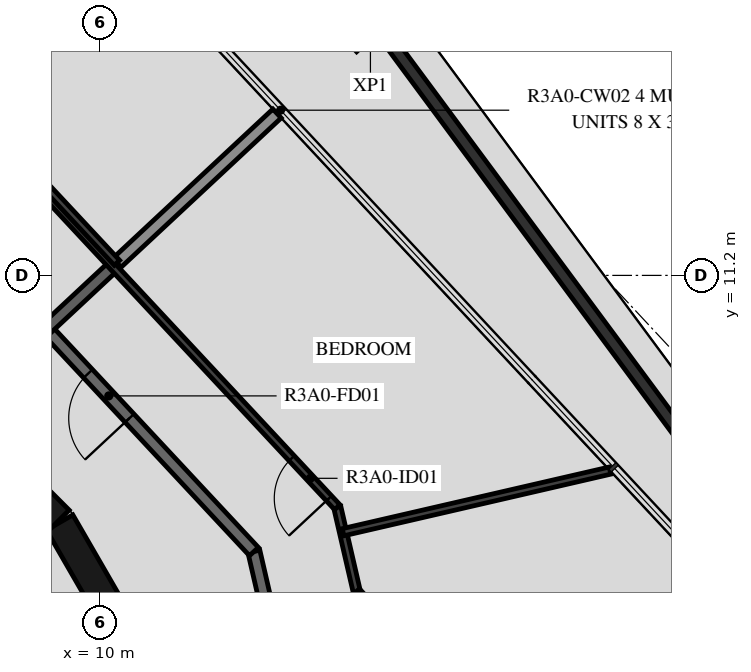
"""IFC4 building model, lengths in metres.
Left out: names, types, materials, properties, quantities, classifications, styles, units other than length and angle.
Written with IfcOpenShell. Run it as: python <this file> out.ifc"""

import sys

from ifc_helpers import new_model, si_unit, direction, frame, frame_2d, origin, place, context, subcontext, project, spatial, rectangle, extrude, element, fill, save


model = new_model("IFC4")
c1 = context("Model", 3, precision=1e-05, world=origin(), true_north=direction((0.0, 1.0)))
c2 = subcontext(c1, "Body", "Model", "MODEL_VIEW")
j1 = project(units=[si_unit("LENGTHUNIT", "METRE"), si_unit("PLANEANGLEUNIT", "RADIAN")], contexts=[c1])
p1 = place(None, origin())
s1 = spatial("IfcSite", under=j1, at=p1, CompositionType="ELEMENT")
p2 = place(p1, origin())
s2 = spatial("IfcBuilding", under=s1, at=p2, CompositionType="ELEMENT")
p3 = place(p2, frame((0.0, 0.0, 113.4)))
s3 = spatial("IfcBuildingStorey", under=s2, at=p3, CompositionType="ELEMENT", Elevation=113.4)
p4 = place(p3, frame((5.146, 28.027, 0.03), z_axis=(0.0, 0.0, 1.0), x_axis=(0.595048436217, -0.803689839774, 0.0)))
e1 = element("IfcWall", 1, at=p4, inside=s3, PredefinedType="PARAPET", context=c2, shape_type="SweptSolid", body=[
    extrude(rectangle(XDim=35.306, YDim=0.2, at=frame_2d((17.653, 0.0))), origin(), (0.0, 0.0, 1.0), 1.5),
])
p5 = place(p3, frame((10.845, 4.51, 0.0), z_axis=(0.0, 0.0, 1.0), x_axis=(-0.500087131594, 0.865975092491, 0.0)))
e2 = element("IfcWall", 2, at=p5, inside=s3, PredefinedType="SHEAR", context=c2, shape_type="SweptSolid", body=[
    extrude(rectangle(XDim=3.033, YDim=0.5, at=frame_2d((1.516, 0.0))), origin(), (0.0, 0.0, 1.0), 3.12),
])
p6 = place(p3, frame((9.308, 7.164, 0.0), z_axis=(0.0, 0.0, 1.0), x_axis=(-0.707106781187, 0.707106781187, 0.0)))
e3 = element("IfcWall", 3, at=p6, inside=s3, PredefinedType="SHEAR", context=c2, shape_type="SweptSolid", body=[
    extrude(rectangle(XDim=3.032, YDim=0.5, at=frame_2d((1.516, 0.0))), origin(), (0.0, 0.0, 1.0), 3.12),
])
p7 = place(p6, frame((0.416, 0.0, 0.0)))
e4 = element("IfcOpeningElement", 4, at=p7, cuts=e3, PredefinedType="OPENING", context=c2, shape_type="SweptSolid", body=[
    extrude(rectangle(XDim=1.2, YDim=2.1, at=frame_2d((0.6, 1.05))), frame((0.0, 0.26, 0.0), z_axis=(0.0, -1.0, 0.0), x_axis=(1.0, 0.0, 0.0)), (0.0, 0.0, 1.0), 0.52),
])
p8 = place(p3, frame((14.175, -0.495, 0.0), z_axis=(0.0, 0.0, 1.0), x_axis=(-0.224922649383, 0.974376622151, 0.0)))
e5 = element("IfcWall", 5, at=p8, inside=s3, PredefinedType="STANDARD", context=c2, shape_type="SweptSolid", body=[
    extrude(rectangle(XDim=7.342, YDim=0.2, at=frame_2d((3.671, 0.0))), origin(), (0.0, 0.0, 1.0), 3.12),
])
p9 = place(p3, frame((12.523, 6.659, 0.0), z_axis=(0.0, 0.0, 1.0), x_axis=(-0.682001841105, 0.731350455479, 0.0)))
e6 = element("IfcWall", 6, at=p9, inside=s3, PredefinedType="STANDARD", context=c2, shape_type="SweptSolid", body=[
    extrude(rectangle(XDim=7.342, YDim=0.2, at=frame_2d((3.671, 0.0))), origin(), (0.0, 0.0, 1.0), 3.12),
])
p10 = place(p9, frame((3.0, 0.0, 0.0)))
e7 = element("IfcOpeningElement", 7, at=p10, cuts=e6, PredefinedType="OPENING", context=c2, shape_type="SweptSolid", body=[
    extrude(rectangle(XDim=1.0, YDim=2.1, at=frame_2d((0.5, 1.05))), frame((0.0, 0.11, 0.0), z_axis=(0.0, -1.0, 0.0), x_axis=(1.0, 0.0, 0.0)), (0.0, 0.0, 1.0), 0.22),
])
p11 = place(p9, frame((5.209, 0.0, 0.0)))
e8 = element("IfcOpeningElement", 8, at=p11, cuts=e6, PredefinedType="OPENING", context=c2, shape_type="SweptSolid", body=[
    extrude(rectangle(XDim=1.0, YDim=2.1, at=frame_2d((0.5, 1.05))), frame((0.0, 0.11, 0.0), z_axis=(0.0, -1.0, 0.0), x_axis=(1.0, 0.0, 0.0)), (0.0, 0.0, 1.0), 0.22),
])
p12 = place(p3, frame((10.233, 11.372, 0.0), z_axis=(0.0, 0.0, 1.0), x_axis=(-0.731329353292, -0.682024469513, 0.0)))
e9 = element("IfcWall", 9, at=p12, inside=s3, PredefinedType="STANDARD", context=c2, shape_type="SweptSolid", body=[
    extrude(rectangle(XDim=1.54, YDim=0.2, at=frame_2d((0.77, 0.0))), origin(), (0.0, 0.0, 1.0), 3.12),
])
p13 = place(p3, frame((12.903, 13.862, 0.0), z_axis=(0.0, 0.0, 1.0), x_axis=(-0.731328084739, -0.682025829769, 0.0)))
e10 = element("IfcWall", 10, at=p13, inside=s3, PredefinedType="STANDARD", context=c2, shape_type="SweptSolid", body=[
    extrude(rectangle(XDim=3.6, YDim=0.2, at=frame_2d((1.8, 0.0))), origin(), (0.0, 0.0, 1.0), 2.73),
])
p14 = place(p3, frame((15.727, -0.549, 0.0), z_axis=(0.0, 0.0, 1.0), x_axis=(-0.22493611855, 0.974373512864, 0.0)))
e11 = element("IfcWall", 11, at=p14, inside=s3, PredefinedType="PARTITIONING", context=c2, shape_type="SweptSolid", body=[
    extrude(rectangle(XDim=8.146, YDim=0.12, at=frame_2d((4.073, 0.0))), origin(), (0.0, 0.0, 1.0), 3.12),
])
p15 = place(p14, frame((1.314, 0.0, 0.0)))
e12 = element("IfcOpeningElement", 12, at=p15, cuts=e11, PredefinedType="OPENING", context=c2, shape_type="SweptSolid", body=[
    extrude(rectangle(XDim=0.8, YDim=2.1, at=frame_2d((0.4, 1.05))), frame((0.0, 0.07, 0.0), z_axis=(0.0, -1.0, 0.0), x_axis=(1.0, 0.0, 0.0)), (0.0, 0.0, 1.0), 0.14),
])
p16 = place(p3, frame((13.894, 7.388, 0.0), z_axis=(0.0, 0.0, 1.0), x_axis=(-0.681994622729, 0.731357186721, 0.0)))
e13 = element("IfcWall", 13, at=p16, inside=s3, PredefinedType="PARTITIONING", context=c2, shape_type="SweptSolid", body=[
    extrude(rectangle(XDim=8.146, YDim=0.12, at=frame_2d((4.073, 0.0))), origin(), (0.0, 0.0, 1.0), 3.12),
])
p17 = place(p16, frame((0.2, 0.0, 0.0)))
e14 = element("IfcOpeningElement", 14, at=p17, cuts=e13, PredefinedType="OPENING", context=c2, shape_type="SweptSolid", body=[
    extrude(rectangle(XDim=0.9, YDim=2.1, at=frame_2d((0.45, 1.05))), frame((0.0, 0.07, 0.0), z_axis=(0.0, -1.0, 0.0), x_axis=(1.0, 0.0, 0.0)), (0.0, 0.0, 1.0), 0.14),
])
p18 = place(p3, frame((14.213, 6.006, 0.0), z_axis=(0.0, 0.0, 1.0), x_axis=(0.681982148724, -0.731368818601, 0.0)))
e15 = element("IfcWall", 15, at=p18, inside=s3, PredefinedType="PARTITIONING", context=c2, shape_type="SweptSolid", body=[
    extrude(rectangle(XDim=10.07, YDim=0.12, at=frame_2d((5.035, 0.0))), origin(), (0.0, 0.0, 1.0), 3.12),
])
p19 = place(p18, frame((5.235, 0.0, 0.0)))
e16 = element("IfcOpeningElement", 16, at=p19, cuts=e15, PredefinedType="OPENING", context=c2, shape_type="SweptSolid", body=[
    extrude(rectangle(XDim=0.9, YDim=2.1, at=frame_2d((0.45, 1.05))), frame((0.0, 0.07, 0.0), z_axis=(0.0, -1.0, 0.0), x_axis=(1.0, 0.0, 0.0)), (0.0, 0.0, 1.0), 0.14),
])
p20 = place(p3, frame((18.379, 7.99, 0.0), z_axis=(0.0, 0.0, 1.0), x_axis=(-0.974372926515, -0.224938658471, 0.0)))
e17 = element("IfcWall", 17, at=p20, inside=s3, PredefinedType="PARTITIONING", context=c2, shape_type="SweptSolid", body=[
    extrude(rectangle(XDim=4.505, YDim=0.12, at=frame_2d((2.253, 0.0))), origin(), (0.0, 0.0, 1.0), 3.12),
])
p21 = place(p3, frame((-1.539, 24.071, 0.0), z_axis=(0.0, 0.0, 1.0), x_axis=(0.68200220595, -0.731350115252, 0.0)))
e18 = element("IfcWall", 18, at=p21, inside=s3, PredefinedType="PARTITIONING", context=c2, shape_type="SweptSolid", body=[
    extrude(rectangle(XDim=17.316, YDim=0.12, at=frame_2d((8.658, 0.0))), origin(), (0.0, 0.0, 1.0), 3.12),
])
p22 = place(p21, frame((3.323, 0.0, 0.0)))
e19 = element("IfcOpeningElement", 19, at=p22, cuts=e18, PredefinedType="OPENING", context=c2, shape_type="SweptSolid", body=[
    extrude(rectangle(XDim=0.9, YDim=2.1, at=frame_2d((0.45, 1.05))), frame((0.0, 0.07, 0.0), z_axis=(0.0, -1.0, 0.0), x_axis=(1.0, 0.0, 0.0)), (0.0, 0.0, 1.0), 0.14),
])
p23 = place(p21, frame((1.417, 0.0, 0.0)))
e20 = element("IfcOpeningElement", 20, at=p23, cuts=e18, PredefinedType="OPENING", context=c2, shape_type="SweptSolid", body=[
    extrude(rectangle(XDim=0.9, YDim=2.1, at=frame_2d((0.45, 1.05))), frame((0.0, 0.07, 0.0), z_axis=(0.0, -1.0, 0.0), x_axis=(1.0, 0.0, 0.0)), (0.0, 0.0, 1.0), 0.14),
])
p24 = place(p10, origin())
e21 = element("IfcDoor", 21, at=p24, inside=s3, OperationType="SINGLE_SWING_LEFT", PredefinedType="DOOR", context=c2, shape_type="SweptSolid", body=[
    extrude(rectangle(XDim=1.0, YDim=2.1, at=frame_2d((0.5, 1.05))), frame((0.0, 0.025, 0.0), z_axis=(0.0, -1.0, 0.0), x_axis=(1.0, 0.0, 0.0)), (0.0, 0.0, 1.0), 0.05),
])
fill(e7, e21)
p25 = place(p17, origin())
e22 = element("IfcDoor", 22, at=p25, inside=s3, OperationType="SINGLE_SWING_LEFT", PredefinedType="DOOR", context=c2, shape_type="SweptSolid", body=[
    extrude(rectangle(XDim=0.9, YDim=2.1, at=frame_2d((0.45, 1.05))), frame((0.0, 0.025, 0.0), z_axis=(0.0, -1.0, 0.0), x_axis=(1.0, 0.0, 0.0)), (0.0, 0.0, 1.0), 0.05),
])
fill(e14, e22)
save(model, sys.argv[1])
